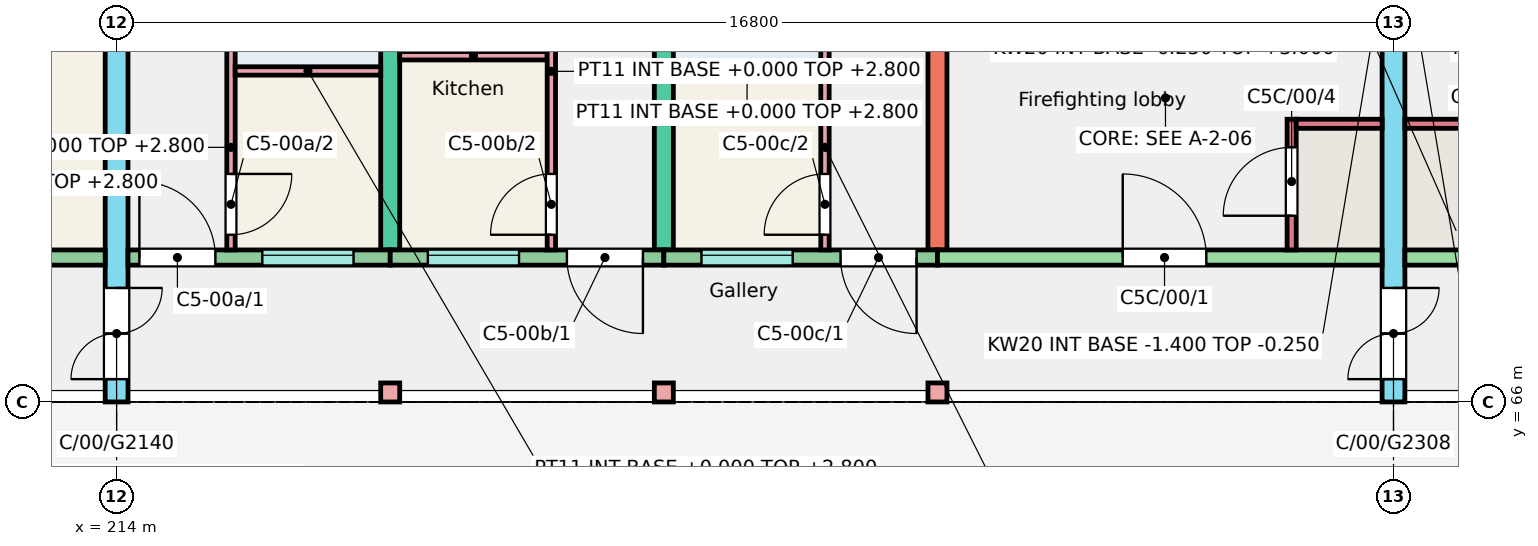
"""IFC4 building model, lengths in metres.
Left out: names, types, materials, properties, quantities, classifications, styles, units other than length and angle.
Written with IfcOpenShell. Run it as: python <this file> out.ifc"""

import sys

from ifc_helpers import new_model, si_unit, direction, frame, frame_2d, origin, origin_2d, place, context, subcontext, project, spatial, rectangle, extrude, element, fill, save


model = new_model("IFC4")
c1 = context("Model", 3, precision=1e-05, world=origin(), true_north=direction((0.0, 1.0)))
c2 = subcontext(c1, "Body", "Model", "MODEL_VIEW")
j1 = project(units=[si_unit("LENGTHUNIT", "METRE"), si_unit("PLANEANGLEUNIT", "RADIAN")], contexts=[c1])
p1 = place(None, origin())
s1 = spatial("IfcSite", under=j1, at=p1, CompositionType="ELEMENT")
p2 = place(p1, origin())
s2 = spatial("IfcBuilding", under=s1, at=p2, CompositionType="ELEMENT")
p3 = place(p2, origin())
s3 = spatial("IfcBuildingStorey", under=s2, at=p3, CompositionType="ELEMENT", Elevation=0.0)
p4 = place(p3, frame((214.0, 66.0, -0.25), z_axis=(0.0, 0.0, 1.0), x_axis=(0.0, 1.0, 0.0)))
e1 = element("IfcWall", 1, at=p4, inside=s3, PredefinedType="SHEAR", context=c2, shape_type="SweptSolid", body=[
    extrude(rectangle(XDim=11.0, YDim=0.3, at=frame_2d((5.5, 0.0))), origin(), (0.0, 0.0, 1.0), 3.25),
])
p5 = place(p4, frame((0.3, 0.0, 0.25)))
e2 = element("IfcOpeningElement", 2, at=p5, cuts=e1, PredefinedType="OPENING", context=c2, shape_type="SweptSolid", body=[
    extrude(rectangle(XDim=1.2, YDim=2.1, at=frame_2d((0.6, 1.05))), frame((0.0, 0.16, 0.0), z_axis=(0.0, -1.0, 0.0), x_axis=(1.0, 0.0, 0.0)), (0.0, 0.0, 1.0), 0.32),
])
for number, where, z_axis, x_axis in (
    (3, (217.6, 68.0, -0.25), (0.0, 0.0, 1.0), (0.0, 1.0, 0.0)),
    (4, (221.2, 68.0, -0.25), (0.0, 0.0, 1.0), (0.0, 1.0, 0.0)),
    (5, (224.8, 68.0, -0.25), (0.0, 0.0, 1.0), (0.0, 1.0, 0.0)),
):
    element("IfcWall", number, at=place(p3, frame(where, z_axis=z_axis, x_axis=x_axis)), inside=s3, PredefinedType="SHEAR", context=c2, shape_type="SweptSolid", body=[
        extrude(rectangle(XDim=9.0, YDim=0.25, at=frame_2d((4.5, 0.0))), origin(), (0.0, 0.0, 1.0), 3.25),
    ])
p6 = place(p3, frame((230.8, 66.0, -0.25), z_axis=(0.0, 0.0, 1.0), x_axis=(0.0, 1.0, 0.0)))
e6 = element("IfcWall", 6, at=p6, inside=s3, PredefinedType="SHEAR", context=c2, shape_type="SweptSolid", body=[
    extrude(rectangle(XDim=11.0, YDim=0.3, at=frame_2d((5.5, 0.0))), origin(), (0.0, 0.0, 1.0), 3.25),
])
p7 = place(p6, frame((0.3, 0.0, 0.25)))
e7 = element("IfcOpeningElement", 7, at=p7, cuts=e6, PredefinedType="OPENING", context=c2, shape_type="SweptSolid", body=[
    extrude(rectangle(XDim=1.2, YDim=2.1, at=frame_2d((0.6, 1.05))), frame((0.0, 0.16, 0.0), z_axis=(0.0, -1.0, 0.0), x_axis=(1.0, 0.0, 0.0)), (0.0, 0.0, 1.0), 0.32),
])
p8 = place(p3, frame((210.4, 67.9, -0.25), z_axis=(0.0, 0.0, 1.0), x_axis=(1.0, 0.0, 0.0)))
e8 = element("IfcWall", 8, at=p8, inside=s3, PredefinedType="SOLIDWALL", context=c2, shape_type="SweptSolid", body=[
    extrude(rectangle(XDim=3.45, YDim=0.2, at=frame_2d((1.725, 0.0))), origin(), (0.0, 0.0, 1.0), 3.25),
])
p9 = place(p8, frame((1.025, 0.0, 1.15)))
e9 = element("IfcOpeningElement", 9, at=p9, cuts=e8, PredefinedType="OPENING", context=c2, shape_type="SweptSolid", body=[
    extrude(rectangle(XDim=1.5, YDim=1.5, at=frame_2d((0.75, 0.75))), frame((0.0, 0.11, 0.0), z_axis=(0.0, -1.0, 0.0), x_axis=(1.0, 0.0, 0.0)), (0.0, 0.0, 1.0), 0.22),
])
p10 = place(p3, frame((214.15, 67.9, -0.25), z_axis=(0.0, 0.0, 1.0), x_axis=(1.0, 0.0, 0.0)))
e10 = element("IfcWall", 10, at=p10, inside=s3, PredefinedType="SOLIDWALL", context=c2, shape_type="SweptSolid", body=[
    extrude(rectangle(XDim=3.45, YDim=0.2, at=frame_2d((1.725, 0.0))), origin(), (0.0, 0.0, 1.0), 3.25),
])
p11 = place(p10, frame((1.768, 0.0, 1.35)))
e11 = element("IfcOpeningElement", 11, at=p11, cuts=e10, PredefinedType="OPENING", context=c2, shape_type="SweptSolid", body=[
    extrude(rectangle(XDim=1.2, YDim=1.3, at=frame_2d((0.6, 0.65))), frame((0.0, 0.11, 0.0), z_axis=(0.0, -1.0, 0.0), x_axis=(1.0, 0.0, 0.0)), (0.0, 0.0, 1.0), 0.22),
])
p12 = place(p10, frame((0.15, 0.0, 0.25)))
e12 = element("IfcOpeningElement", 12, at=p12, cuts=e10, PredefinedType="OPENING", context=c2, shape_type="SweptSolid", body=[
    extrude(rectangle(XDim=1.0, YDim=2.1, at=frame_2d((0.5, 1.05))), frame((0.0, 0.11, 0.0), z_axis=(0.0, -1.0, 0.0), x_axis=(1.0, 0.0, 0.0)), (0.0, 0.0, 1.0), 0.22),
])
p13 = place(p3, frame((217.6, 67.9, -0.25), z_axis=(0.0, 0.0, 1.0), x_axis=(1.0, 0.0, 0.0)))
e13 = element("IfcWall", 13, at=p13, inside=s3, PredefinedType="SOLIDWALL", context=c2, shape_type="SweptSolid", body=[
    extrude(rectangle(XDim=3.6, YDim=0.2, at=frame_2d((1.8, 0.0))), origin(), (0.0, 0.0, 1.0), 3.25),
])
p14 = place(p13, frame((0.495, 0.0, 1.35)))
e14 = element("IfcOpeningElement", 14, at=p14, cuts=e13, PredefinedType="OPENING", context=c2, shape_type="SweptSolid", body=[
    extrude(rectangle(XDim=1.2, YDim=1.3, at=frame_2d((0.6, 0.65))), frame((0.0, 0.11, 0.0), z_axis=(0.0, -1.0, 0.0), x_axis=(1.0, 0.0, 0.0)), (0.0, 0.0, 1.0), 0.22),
])
p15 = place(p13, frame((2.325, 0.0, 0.25)))
e15 = element("IfcOpeningElement", 15, at=p15, cuts=e13, PredefinedType="OPENING", context=c2, shape_type="SweptSolid", body=[
    extrude(rectangle(XDim=1.0, YDim=2.1, at=frame_2d((0.5, 1.05))), frame((0.0, 0.11, 0.0), z_axis=(0.0, -1.0, 0.0), x_axis=(1.0, 0.0, 0.0)), (0.0, 0.0, 1.0), 0.22),
])
p16 = place(p3, frame((221.2, 67.9, -0.25), z_axis=(0.0, 0.0, 1.0), x_axis=(1.0, 0.0, 0.0)))
e16 = element("IfcWall", 16, at=p16, inside=s3, PredefinedType="SOLIDWALL", context=c2, shape_type="SweptSolid", body=[
    extrude(rectangle(XDim=3.6, YDim=0.2, at=frame_2d((1.8, 0.0))), origin(), (0.0, 0.0, 1.0), 3.25),
])
p17 = place(p16, frame((0.495, 0.0, 1.35)))
e17 = element("IfcOpeningElement", 17, at=p17, cuts=e16, PredefinedType="OPENING", context=c2, shape_type="SweptSolid", body=[
    extrude(rectangle(XDim=1.2, YDim=1.3, at=frame_2d((0.6, 0.65))), frame((0.0, 0.11, 0.0), z_axis=(0.0, -1.0, 0.0), x_axis=(1.0, 0.0, 0.0)), (0.0, 0.0, 1.0), 0.22),
])
p18 = place(p16, frame((2.325, 0.0, 0.25)))
e18 = element("IfcOpeningElement", 18, at=p18, cuts=e16, PredefinedType="OPENING", context=c2, shape_type="SweptSolid", body=[
    extrude(rectangle(XDim=1.0, YDim=2.1, at=frame_2d((0.5, 1.05))), frame((0.0, 0.11, 0.0), z_axis=(0.0, -1.0, 0.0), x_axis=(1.0, 0.0, 0.0)), (0.0, 0.0, 1.0), 0.22),
])
p19 = place(p3, frame((224.8, 67.9, -0.25), z_axis=(0.0, 0.0, 1.0), x_axis=(1.0, 0.0, 0.0)))
e19 = element("IfcWall", 19, at=p19, inside=s3, PredefinedType="SHEAR", context=c2, shape_type="SweptSolid", body=[
    extrude(rectangle(XDim=5.85, YDim=0.2, at=frame_2d((2.925, 0.0))), origin(), (0.0, 0.0, 1.0), 3.25),
])
p20 = place(p19, frame((2.438, 0.0, 0.25)))
e20 = element("IfcOpeningElement", 20, at=p20, cuts=e19, PredefinedType="OPENING", context=c2, shape_type="SweptSolid", body=[
    extrude(rectangle(XDim=1.1, YDim=2.1, at=frame_2d((0.55, 1.05))), frame((0.0, 0.11, 0.0), z_axis=(0.0, -1.0, 0.0), x_axis=(1.0, 0.0, 0.0)), (0.0, 0.0, 1.0), 0.22),
])
p21 = place(p3, frame((229.46, 68.0, -0.25), z_axis=(0.0, 0.0, 1.0), x_axis=(0.0, 1.0, 0.0)))
e21 = element("IfcWall", 21, at=p21, inside=s3, PredefinedType="SHEAR", context=c2, shape_type="SweptSolid", body=[
    extrude(rectangle(XDim=1.72, YDim=0.12, at=frame_2d((0.86, 0.0))), origin(), (0.0, 0.0, 1.0), 3.25),
])
p22 = place(p21, frame((0.45, 0.0, 0.25)))
e22 = element("IfcOpeningElement", 22, at=p22, cuts=e21, PredefinedType="OPENING", context=c2, shape_type="SweptSolid", body=[
    extrude(rectangle(XDim=0.9, YDim=2.1, at=frame_2d((0.45, 1.05))), frame((0.0, 0.07, 0.0), z_axis=(0.0, -1.0, 0.0), x_axis=(1.0, 0.0, 0.0)), (0.0, 0.0, 1.0), 0.14),
])
p23 = place(p3, frame((229.52, 69.66, -0.25), z_axis=(0.0, 0.0, 1.0), x_axis=(1.0, 0.0, 0.0)))
e23 = element("IfcWall", 23, at=p23, inside=s3, PredefinedType="SHEAR", context=c2, shape_type="SweptSolid", body=[
    extrude(rectangle(XDim=1.13, YDim=0.12, at=frame_2d((0.565, 0.0))), origin(), (0.0, 0.0, 1.0), 3.25),
])
p24 = place(p3, frame((230.95, 67.9, -0.25), z_axis=(0.0, 0.0, 1.0), x_axis=(1.0, 0.0, 0.0)))
e24 = element("IfcWall", 24, at=p24, inside=s3, PredefinedType="SHEAR", context=c2, shape_type="SweptSolid", body=[
    extrude(rectangle(XDim=5.85, YDim=0.2, at=frame_2d((2.925, 0.0))), origin(), (0.0, 0.0, 1.0), 3.25),
])
p25 = place(p24, frame((2.312, 0.0, 0.25)))
e25 = element("IfcOpeningElement", 25, at=p25, cuts=e24, PredefinedType="OPENING", context=c2, shape_type="SweptSolid", body=[
    extrude(rectangle(XDim=1.1, YDim=2.1, at=frame_2d((0.55, 1.05))), frame((0.0, 0.11, 0.0), z_axis=(0.0, -1.0, 0.0), x_axis=(1.0, 0.0, 0.0)), (0.0, 0.0, 1.0), 0.22),
])
p26 = place(p3, frame((230.95, 69.66, -0.25), z_axis=(0.0, 0.0, 1.0), x_axis=(1.0, 0.0, 0.0)))
e26 = element("IfcWall", 26, at=p26, inside=s3, PredefinedType="SHEAR", context=c2, shape_type="SweptSolid", body=[
    extrude(rectangle(XDim=1.13, YDim=0.12, at=frame_2d((0.565, 0.0))), origin(), (0.0, 0.0, 1.0), 3.25),
])
for number, where, z_axis, x_axis in (
    (27, (217.6, 66.125, -0.25), (0.0, 0.0, 1.0), (1.0, 0.0, 0.0)),
    (28, (221.2, 66.125, -0.25), (0.0, 0.0, 1.0), (1.0, 0.0, 0.0)),
    (29, (224.8, 66.125, -0.25), (0.0, 0.0, 1.0), (1.0, 0.0, 0.0)),
):
    element("IfcColumn", number, at=place(p3, frame(where, z_axis=z_axis, x_axis=x_axis)), inside=s3, PredefinedType="COLUMN", context=c2, shape_type="SweptSolid", body=[
        extrude(rectangle(XDim=0.25, YDim=0.25, at=origin_2d()), origin(), (0.0, 0.0, 1.0), 3.25),
    ])
p27 = place(p3, frame((215.505, 68.0, 0.0), z_axis=(0.0, 0.0, 1.0), x_axis=(0.0, 1.0, 0.0)))
e30 = element("IfcWall", 30, at=p27, inside=s3, PredefinedType="PARTITIONING", context=c2, shape_type="SweptSolid", body=[
    extrude(rectangle(XDim=4.5, YDim=0.11, at=frame_2d((2.25, 0.0))), origin(), (0.0, 0.0, 1.0), 2.8),
])
p28 = place(p27, frame((0.2, 0.0, 0.0)))
e31 = element("IfcOpeningElement", 31, at=p28, cuts=e30, PredefinedType="OPENING", context=c2, shape_type="SweptSolid", body=[
    extrude(rectangle(XDim=0.8, YDim=2.1, at=frame_2d((0.4, 1.05))), frame((0.0, 0.065, 0.0), z_axis=(0.0, -1.0, 0.0), x_axis=(1.0, 0.0, 0.0)), (0.0, 0.0, 1.0), 0.13),
])
p29 = place(p27, frame((3.55, 0.0, 0.0)))
e32 = element("IfcOpeningElement", 32, at=p29, cuts=e30, PredefinedType="OPENING", context=c2, shape_type="SweptSolid", body=[
    extrude(rectangle(XDim=0.8, YDim=2.1, at=frame_2d((0.4, 1.05))), frame((0.0, 0.065, 0.0), z_axis=(0.0, -1.0, 0.0), x_axis=(1.0, 0.0, 0.0)), (0.0, 0.0, 1.0), 0.13),
])
p30 = place(p3, frame((215.56, 70.355, 0.0), z_axis=(0.0, 0.0, 1.0), x_axis=(1.0, 0.0, 0.0)))
e33 = element("IfcWall", 33, at=p30, inside=s3, PredefinedType="PARTITIONING", context=c2, shape_type="SweptSolid", body=[
    extrude(rectangle(XDim=1.915, YDim=0.11, at=frame_2d((0.958, 0.0))), origin(), (0.0, 0.0, 1.0), 2.8),
])
p31 = place(p3, frame((217.725, 70.555, 0.0), z_axis=(0.0, 0.0, 1.0), x_axis=(1.0, 0.0, 0.0)))
e34 = element("IfcWall", 34, at=p31, inside=s3, PredefinedType="PARTITIONING", context=c2, shape_type="SweptSolid", body=[
    extrude(rectangle(XDim=1.94, YDim=0.11, at=frame_2d((0.97, 0.0))), origin(), (0.0, 0.0, 1.0), 2.8),
])
p32 = place(p3, frame((219.72, 68.0, 0.0), z_axis=(0.0, 0.0, 1.0), x_axis=(0.0, 1.0, 0.0)))
e35 = element("IfcWall", 35, at=p32, inside=s3, PredefinedType="PARTITIONING", context=c2, shape_type="SweptSolid", body=[
    extrude(rectangle(XDim=4.7, YDim=0.11, at=frame_2d((2.35, 0.0))), origin(), (0.0, 0.0, 1.0), 2.8),
])
p33 = place(p32, frame((0.2, 0.0, 0.0)))
e36 = element("IfcOpeningElement", 36, at=p33, cuts=e35, PredefinedType="OPENING", context=c2, shape_type="SweptSolid", body=[
    extrude(rectangle(XDim=0.8, YDim=2.1, at=frame_2d((0.4, 1.05))), frame((0.0, 0.065, 0.0), z_axis=(0.0, -1.0, 0.0), x_axis=(1.0, 0.0, 0.0)), (0.0, 0.0, 1.0), 0.13),
])
p34 = place(p32, frame((3.75, 0.0, 0.0)))
e37 = element("IfcOpeningElement", 37, at=p34, cuts=e35, PredefinedType="OPENING", context=c2, shape_type="SweptSolid", body=[
    extrude(rectangle(XDim=0.8, YDim=2.1, at=frame_2d((0.4, 1.05))), frame((0.0, 0.065, 0.0), z_axis=(0.0, -1.0, 0.0), x_axis=(1.0, 0.0, 0.0)), (0.0, 0.0, 1.0), 0.13),
])
p35 = place(p3, frame((221.325, 70.355, 0.0), z_axis=(0.0, 0.0, 1.0), x_axis=(1.0, 0.0, 0.0)))
e38 = element("IfcWall", 38, at=p35, inside=s3, PredefinedType="PARTITIONING", context=c2, shape_type="SweptSolid", body=[
    extrude(rectangle(XDim=1.94, YDim=0.11, at=frame_2d((0.97, 0.0))), origin(), (0.0, 0.0, 1.0), 2.8),
])
p36 = place(p3, frame((223.32, 68.0, 0.0), z_axis=(0.0, 0.0, 1.0), x_axis=(0.0, 1.0, 0.0)))
e39 = element("IfcWall", 39, at=p36, inside=s3, PredefinedType="PARTITIONING", context=c2, shape_type="SweptSolid", body=[
    extrude(rectangle(XDim=4.5, YDim=0.11, at=frame_2d((2.25, 0.0))), origin(), (0.0, 0.0, 1.0), 2.8),
])
p37 = place(p36, frame((0.2, 0.0, 0.0)))
e40 = element("IfcOpeningElement", 40, at=p37, cuts=e39, PredefinedType="OPENING", context=c2, shape_type="SweptSolid", body=[
    extrude(rectangle(XDim=0.8, YDim=2.1, at=frame_2d((0.4, 1.05))), frame((0.0, 0.065, 0.0), z_axis=(0.0, -1.0, 0.0), x_axis=(1.0, 0.0, 0.0)), (0.0, 0.0, 1.0), 0.13),
])
p38 = place(p36, frame((3.55, 0.0, 0.0)))
e41 = element("IfcOpeningElement", 41, at=p38, cuts=e39, PredefinedType="OPENING", context=c2, shape_type="SweptSolid", body=[
    extrude(rectangle(XDim=0.8, YDim=2.1, at=frame_2d((0.4, 1.05))), frame((0.0, 0.065, 0.0), z_axis=(0.0, -1.0, 0.0), x_axis=(1.0, 0.0, 0.0)), (0.0, 0.0, 1.0), 0.13),
])
p39 = place(p11, origin())
e42 = element("IfcWindow", 42, at=p39, inside=s3, PartitioningType="SINGLE_PANEL", PredefinedType="WINDOW", context=c2, shape_type="SweptSolid", body=[
    extrude(rectangle(XDim=1.2, YDim=1.3, at=frame_2d((0.6, 0.65))), frame((0.0, 0.06, 0.0), z_axis=(0.0, -1.0, 0.0), x_axis=(1.0, 0.0, 0.0)), (0.0, 0.0, 1.0), 0.06),
])
fill(e11, e42)
p40 = place(p14, origin())
e43 = element("IfcWindow", 43, at=p40, inside=s3, PartitioningType="SINGLE_PANEL", PredefinedType="WINDOW", context=c2, shape_type="SweptSolid", body=[
    extrude(rectangle(XDim=1.2, YDim=1.3, at=frame_2d((0.6, 0.65))), frame((0.0, 0.06, 0.0), z_axis=(0.0, -1.0, 0.0), x_axis=(1.0, 0.0, 0.0)), (0.0, 0.0, 1.0), 0.06),
])
fill(e14, e43)
p41 = place(p17, origin())
e44 = element("IfcWindow", 44, at=p41, inside=s3, PartitioningType="SINGLE_PANEL", PredefinedType="WINDOW", context=c2, shape_type="SweptSolid", body=[
    extrude(rectangle(XDim=1.2, YDim=1.3, at=frame_2d((0.6, 0.65))), frame((0.0, 0.06, 0.0), z_axis=(0.0, -1.0, 0.0), x_axis=(1.0, 0.0, 0.0)), (0.0, 0.0, 1.0), 0.06),
])
fill(e17, e44)
p42 = place(p12, origin())
e45 = element("IfcDoor", 45, at=p42, inside=s3, OperationType="SINGLE_SWING_LEFT", PredefinedType="DOOR", context=c2, shape_type="SweptSolid", body=[
    extrude(rectangle(XDim=1.0, YDim=2.1, at=frame_2d((0.5, 1.05))), frame((0.0, 0.025, 0.0), z_axis=(0.0, -1.0, 0.0), x_axis=(1.0, 0.0, 0.0)), (0.0, 0.0, 1.0), 0.05),
])
fill(e12, e45)
p43 = place(p28, origin())
e46 = element("IfcDoor", 46, at=p43, inside=s3, OperationType="SINGLE_SWING_RIGHT", PredefinedType="DOOR", context=c2, shape_type="SweptSolid", body=[
    extrude(rectangle(XDim=0.8, YDim=2.1, at=frame_2d((0.4, 1.05))), frame((0.0, 0.025, 0.0), z_axis=(0.0, -1.0, 0.0), x_axis=(1.0, 0.0, 0.0)), (0.0, 0.0, 1.0), 0.05),
])
fill(e31, e46)
p44 = place(p15, origin())
e47 = element("IfcDoor", 47, at=p44, inside=s3, OperationType="SINGLE_SWING_RIGHT", PredefinedType="DOOR", context=c2, shape_type="SweptSolid", body=[
    extrude(rectangle(XDim=1.0, YDim=2.1, at=frame_2d((0.5, 1.05))), frame((0.0, 0.025, 0.0), z_axis=(0.0, -1.0, 0.0), x_axis=(1.0, 0.0, 0.0)), (0.0, 0.0, 1.0), 0.05),
])
fill(e15, e47)
p45 = place(p33, origin())
e48 = element("IfcDoor", 48, at=p45, inside=s3, OperationType="SINGLE_SWING_LEFT", PredefinedType="DOOR", context=c2, shape_type="SweptSolid", body=[
    extrude(rectangle(XDim=0.8, YDim=2.1, at=frame_2d((0.4, 1.05))), frame((0.0, 0.025, 0.0), z_axis=(0.0, -1.0, 0.0), x_axis=(1.0, 0.0, 0.0)), (0.0, 0.0, 1.0), 0.05),
])
fill(e36, e48)
p46 = place(p18, origin())
e49 = element("IfcDoor", 49, at=p46, inside=s3, OperationType="SINGLE_SWING_RIGHT", PredefinedType="DOOR", context=c2, shape_type="SweptSolid", body=[
    extrude(rectangle(XDim=1.0, YDim=2.1, at=frame_2d((0.5, 1.05))), frame((0.0, 0.025, 0.0), z_axis=(0.0, -1.0, 0.0), x_axis=(1.0, 0.0, 0.0)), (0.0, 0.0, 1.0), 0.05),
])
fill(e18, e49)
p47 = place(p37, origin())
e50 = element("IfcDoor", 50, at=p47, inside=s3, OperationType="SINGLE_SWING_LEFT", PredefinedType="DOOR", context=c2, shape_type="SweptSolid", body=[
    extrude(rectangle(XDim=0.8, YDim=2.1, at=frame_2d((0.4, 1.05))), frame((0.0, 0.025, 0.0), z_axis=(0.0, -1.0, 0.0), x_axis=(1.0, 0.0, 0.0)), (0.0, 0.0, 1.0), 0.05),
])
fill(e40, e50)
p48 = place(p20, origin())
e51 = element("IfcDoor", 51, at=p48, inside=s3, OperationType="SINGLE_SWING_LEFT", PredefinedType="DOOR", context=c2, shape_type="SweptSolid", body=[
    extrude(rectangle(XDim=1.1, YDim=2.1, at=frame_2d((0.55, 1.05))), frame((0.0, 0.025, 0.0), z_axis=(0.0, -1.0, 0.0), x_axis=(1.0, 0.0, 0.0)), (0.0, 0.0, 1.0), 0.05),
])
fill(e20, e51)
p49 = place(p22, origin())
e52 = element("IfcDoor", 52, at=p49, inside=s3, OperationType="SINGLE_SWING_LEFT", PredefinedType="DOOR", context=c2, shape_type="SweptSolid", body=[
    extrude(rectangle(XDim=0.9, YDim=2.1, at=frame_2d((0.45, 1.05))), frame((0.0, 0.025, 0.0), z_axis=(0.0, -1.0, 0.0), x_axis=(1.0, 0.0, 0.0)), (0.0, 0.0, 1.0), 0.05),
])
fill(e22, e52)
p50 = place(p5, origin())
e53 = element("IfcDoor", 53, at=p50, inside=s3, OperationType="DOUBLE_DOOR_SINGLE_SWING", PredefinedType="DOOR", context=c2, shape_type="SweptSolid", body=[
    extrude(rectangle(XDim=1.2, YDim=2.1, at=frame_2d((0.6, 1.05))), frame((0.0, 0.025, 0.0), z_axis=(0.0, -1.0, 0.0), x_axis=(1.0, 0.0, 0.0)), (0.0, 0.0, 1.0), 0.05),
])
fill(e2, e53)
p51 = place(p7, origin())
e54 = element("IfcDoor", 54, at=p51, inside=s3, OperationType="DOUBLE_DOOR_SINGLE_SWING", PredefinedType="DOOR", context=c2, shape_type="SweptSolid", body=[
    extrude(rectangle(XDim=1.2, YDim=2.1, at=frame_2d((0.6, 1.05))), frame((0.0, 0.025, 0.0), z_axis=(0.0, -1.0, 0.0), x_axis=(1.0, 0.0, 0.0)), (0.0, 0.0, 1.0), 0.05),
])
fill(e7, e54)
save(model, sys.argv[1])
